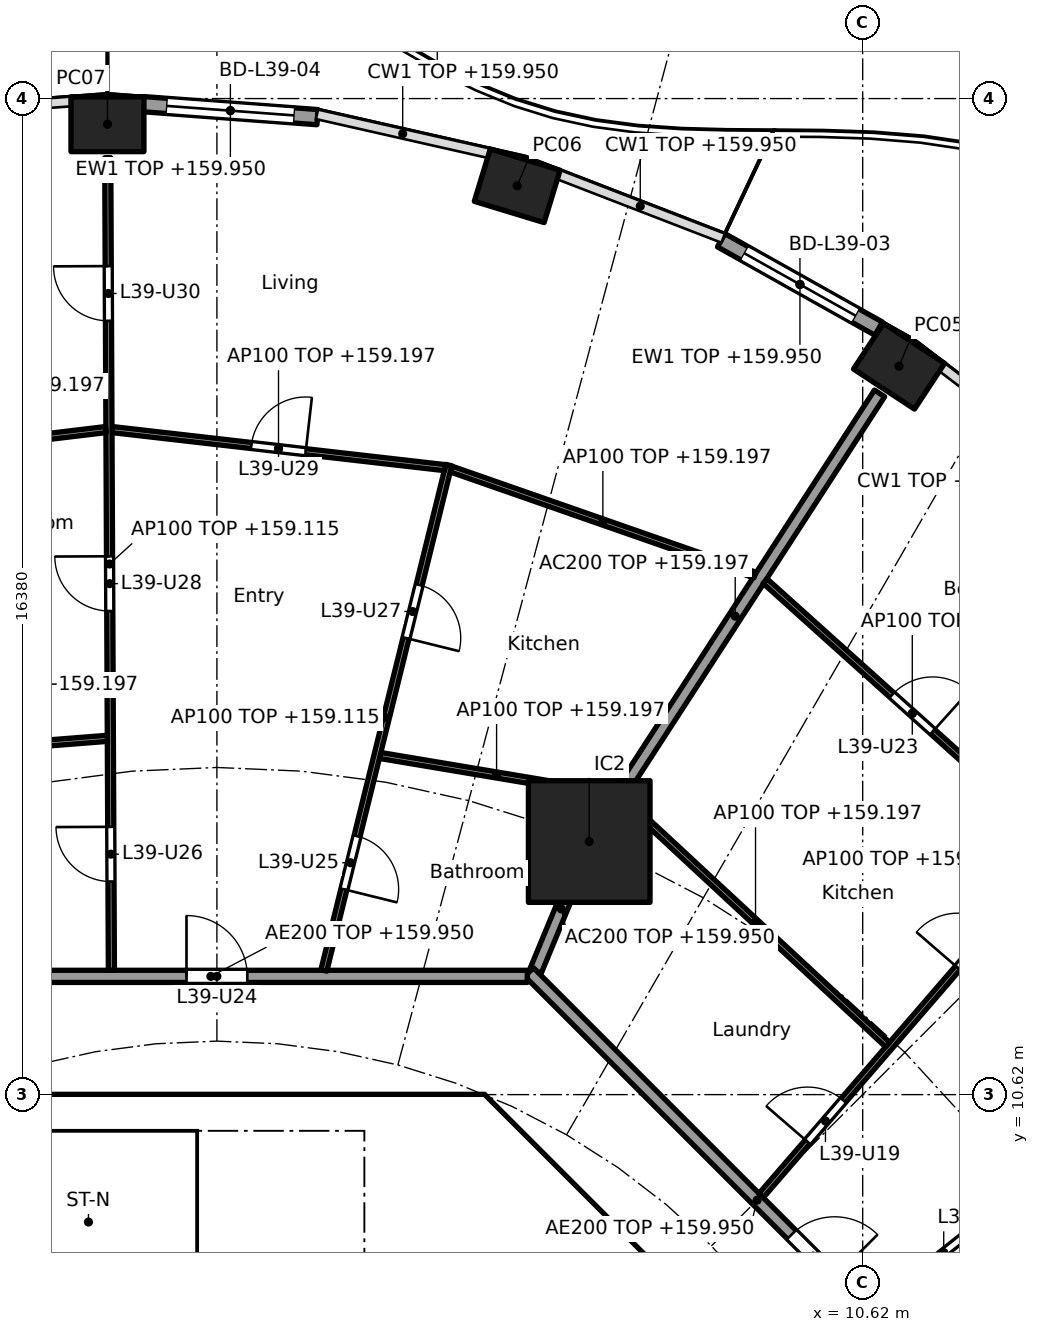
"""IFC4 building model, lengths in metres.
Left out: names, types, materials, properties, quantities, classifications, styles, units other than length and angle.
Written with IfcOpenShell. Run it as: python <this file> out.ifc"""

import sys

from ifc_helpers import new_model, si_unit, direction, frame, frame_2d, origin, origin_2d, place, context, subcontext, project, spatial, polyline, rectangle, hollow_rectangle, outline, extrude, element, fill, save


model = new_model("IFC4")
c1 = context("Model", 3, precision=1e-05, world=origin(), true_north=direction((0.0, 1.0)))
c2 = subcontext(c1, "Body", "Model", "MODEL_VIEW")
j1 = project(units=[si_unit("LENGTHUNIT", "METRE"), si_unit("PLANEANGLEUNIT", "RADIAN")], contexts=[c1])
p1 = place(None, origin())
s1 = spatial("IfcSite", under=j1, at=p1, CompositionType="ELEMENT")
p2 = place(p1, origin())
s2 = spatial("IfcBuilding", under=s1, at=p2, CompositionType="ELEMENT")
p3 = place(p2, frame((0.0, 0.0, 156.6)))
s3 = spatial("IfcBuildingStorey", under=s2, at=p3, CompositionType="ELEMENT", Elevation=156.6)
for number, where, z_axis, x_axis in (
    (1, (11.218, 22.599, 0.0), (0.0, 0.0, 1.0), (-0.836, 0.549, 0.0)),
    (2, (4.938, 25.565, 0.0), (0.0, 0.0, 1.0), (-0.957, 0.292, 0.0)),
    (3, (-1.8, 26.577, 0.0), (0.0, 0.0, 1.0), (-1.0, 0.0, 0.0)),
):
    element("IfcColumn", number, at=place(p3, frame(where, z_axis=z_axis, x_axis=x_axis)), inside=s3, PredefinedType="COLUMN", context=c2, shape_type="SweptSolid", body=[
        extrude(hollow_rectangle(XDim=1.2, YDim=0.9, WallThickness=0.04, at=origin_2d()), origin(), (0.0, 0.0, 1.0), 3.7),
    ])
p4 = place(p3, frame((6.123, 14.782, 0.0), z_axis=(0.0, 0.0, 1.0), x_axis=(1.0, 0.0, 0.0)))
e4 = element("IfcColumn", 4, at=p4, inside=s3, PredefinedType="COLUMN", context=c2, shape_type="SweptSolid", body=[
    extrude(rectangle(XDim=2.0, YDim=2.0, at=origin_2d()), origin(), (0.0, 0.0, 1.0), 3.7),
])
p5 = place(p3, frame((8.293, 24.67, 0.0), z_axis=(0.0, 0.0, 1.0), x_axis=(0.87206688547, -0.489386705241, 0.0)))
e5 = element("IfcWall", 5, at=p5, inside=s3, PredefinedType="SOLIDWALL", context=c2, shape_type="SweptSolid", body=[
    extrude(rectangle(XDim=2.97, YDim=0.25, at=frame_2d((1.485, 0.0))), origin(), (0.0, 0.0, 1.0), 3.35),
])
p6 = place(p5, frame((0.435, 0.0, 0.0)))
e6 = element("IfcOpeningElement", 6, at=p6, cuts=e5, PredefinedType="OPENING", context=c2, shape_type="SweptSolid", body=[
    extrude(rectangle(XDim=2.1, YDim=2.4, at=frame_2d((1.05, 1.2))), frame((0.0, 0.135, 0.0), z_axis=(0.0, -1.0, 0.0), x_axis=(1.0, 0.0, 0.0)), (0.0, 0.0, 1.0), 0.27),
])
p7 = place(p3, frame((-1.211, 26.908, 0.0), z_axis=(0.0, 0.0, 1.0), x_axis=(0.997232166829, -0.074350557769, 0.0)))
e7 = element("IfcWall", 7, at=p7, inside=s3, PredefinedType="SOLIDWALL", context=c2, shape_type="SweptSolid", body=[
    extrude(rectangle(XDim=2.873, YDim=0.25, at=frame_2d((1.437, 0.0))), origin(), (0.0, 0.0, 1.0), 3.35),
])
p8 = place(p7, frame((0.386, 0.0, 0.0)))
e8 = element("IfcOpeningElement", 8, at=p8, cuts=e7, PredefinedType="OPENING", context=c2, shape_type="SweptSolid", body=[
    extrude(rectangle(XDim=2.1, YDim=2.4, at=frame_2d((1.05, 1.2))), frame((0.0, 0.135, 0.0), z_axis=(0.0, -1.0, 0.0), x_axis=(1.0, 0.0, 0.0)), (0.0, 0.0, 1.0), 0.27),
])
p9 = place(p3, frame((9.988, 4.613, 0.0), z_axis=(0.0, 0.0, 1.0), x_axis=(-0.707106781187, 0.707106781187, 0.0)))
e9 = element("IfcWall", 9, at=p9, inside=s3, PredefinedType="SHEAR", context=c2, shape_type="SweptSolid", body=[
    extrude(rectangle(XDim=7.602, YDim=0.6, at=frame_2d((3.801, 0.0))), origin(), (0.0, 0.0, 1.0), 3.35),
])
p10 = place(p9, frame((3.201, 0.0, 0.0)))
e10 = element("IfcOpeningElement", 10, at=p10, cuts=e9, PredefinedType="OPENING", context=c2, shape_type="SweptSolid", body=[
    extrude(rectangle(XDim=1.2, YDim=2.1, at=frame_2d((0.6, 1.05))), frame((0.0, 0.31, 0.0), z_axis=(0.0, -1.0, 0.0), x_axis=(1.0, 0.0, 0.0)), (0.0, 0.0, 1.0), 0.62),
])
p11 = place(p3, frame((4.0, 7.025, 0.0), z_axis=(0.0, 0.0, 1.0), x_axis=(0.0, 1.0, 0.0)))
e11 = element("IfcWall", 11, at=p11, inside=s3, PredefinedType="SOLIDWALL", context=c2, shape_type="SweptSolid", body=[
    extrude(rectangle(XDim=3.0, YDim=0.2, at=frame_2d((1.5, 0.0))), origin(), (0.0, 0.0, 1.0), 3.35),
])
p12 = place(p11, frame((0.925, 0.0, 0.0)))
e12 = element("IfcOpeningElement", 12, at=p12, cuts=e11, PredefinedType="OPENING", context=c2, shape_type="SweptSolid", body=[
    extrude(rectangle(XDim=1.1, YDim=2.1, at=frame_2d((0.55, 1.05))), frame((0.0, 0.11, 0.0), z_axis=(0.0, -1.0, 0.0), x_axis=(1.0, 0.0, 0.0)), (0.0, 0.0, 1.0), 0.22),
])
p13 = place(p3, origin())
e13 = element("IfcWall", 13, at=p13, inside=s3, PredefinedType="SHEAR", context=c2, shape_type="SweptSolid", body=[
    extrude(outline(polyline([(-4.152, 10.025), (-4.401, 9.776), (-4.825, 10.2), (-4.401, 10.625), (4.401, 10.625), (4.825, 10.2), (4.401, 9.776), (4.152, 10.025), (-4.152, 10.025)])), origin(), (0.0, 0.0, 1.0), 3.35),
])
p14 = place(p3, frame((5.243, 12.657, 0.0), z_axis=(0.0, 0.0, 1.0), x_axis=(0.38273085373, 0.923859888513, 0.0)))
e14 = element("IfcWall", 14, at=p14, inside=s3, PredefinedType="PARTITIONING", context=c2, shape_type="SweptSolid", body=[
    extrude(rectangle(XDim=2.199, YDim=0.2, at=frame_2d((1.1, 0.0))), origin(), (0.0, 0.0, 1.0), 3.35),
])
p15 = place(p3, frame((6.15, 14.824, 0.0), z_axis=(0.0, 0.0, 1.0), x_axis=(0.543695254109, 0.839282711998, 0.0)))
e15 = element("IfcWall", 15, at=p15, inside=s3, PredefinedType="PARTITIONING", context=c2, shape_type="SweptSolid", body=[
    extrude(rectangle(XDim=8.731, YDim=0.2, at=frame_2d((4.366, 0.0))), origin(), (0.0, 0.0, 1.0), 2.597),
])
p16 = place(p3, frame((12.635, 5.134, 0.0), z_axis=(0.0, 0.0, 1.0), x_axis=(-0.707106781187, 0.707106781187, 0.0)))
e16 = element("IfcWall", 16, at=p16, inside=s3, PredefinedType="PARTITIONING", context=c2, shape_type="SweptSolid", body=[
    extrude(rectangle(XDim=10.609, YDim=0.2, at=frame_2d((5.305, 0.0))), origin(), (0.0, 0.0, 1.0), 3.35),
])
p17 = place(p16, frame((3.503, 0.0, 0.0)))
e17 = element("IfcOpeningElement", 17, at=p17, cuts=e16, PredefinedType="OPENING", context=c2, shape_type="SweptSolid", body=[
    extrude(rectangle(XDim=1.0, YDim=2.1, at=frame_2d((0.5, 1.05))), frame((0.0, 0.11, 0.0), z_axis=(0.0, -1.0, 0.0), x_axis=(1.0, 0.0, 0.0)), (0.0, 0.0, 1.0), 0.22),
])
p18 = place(p3, frame((5.104, 12.565, 0.0), z_axis=(0.0, 0.0, 1.0), x_axis=(-1.0, 0.0, 0.0)))
e18 = element("IfcWall", 18, at=p18, inside=s3, PredefinedType="PARTITIONING", context=c2, shape_type="SweptSolid", body=[
    extrude(rectangle(XDim=10.409, YDim=0.2, at=frame_2d((5.205, 0.0))), origin(), (0.0, 0.0, 1.0), 3.35),
])
p19 = place(p18, frame((4.604, 0.0, 0.0)))
e19 = element("IfcOpeningElement", 19, at=p19, cuts=e18, PredefinedType="OPENING", context=c2, shape_type="SweptSolid", body=[
    extrude(rectangle(XDim=1.0, YDim=2.1, at=frame_2d((0.5, 1.05))), frame((0.0, 0.11, 0.0), z_axis=(0.0, -1.0, 0.0), x_axis=(1.0, 0.0, 0.0)), (0.0, 0.0, 1.0), 0.22),
])
p20 = place(p3, frame((10.803, 7.107, 0.0), z_axis=(0.0, 0.0, 1.0), x_axis=(0.782908385935, 0.622137010017, 0.0)))
e20 = element("IfcWall", 20, at=p20, inside=s3, PredefinedType="PARTITIONING", context=c2, shape_type="SweptSolid", body=[
    extrude(rectangle(XDim=2.937, YDim=0.1, at=frame_2d((1.469, 0.0))), origin(), (0.0, 0.0, 1.0), 2.515),
])
p21 = place(p20, frame((1.019, 0.0, 0.0)))
e21 = element("IfcOpeningElement", 21, at=p21, cuts=e20, PredefinedType="OPENING", context=c2, shape_type="SweptSolid", body=[
    extrude(rectangle(XDim=0.9, YDim=2.1, at=frame_2d((0.45, 1.05))), frame((0.0, 0.06, 0.0), z_axis=(0.0, -1.0, 0.0), x_axis=(1.0, 0.0, 0.0)), (0.0, 0.0, 1.0), 0.12),
])
p22 = place(p3, frame((8.95, 8.96, 0.0), z_axis=(0.0, 0.0, 1.0), x_axis=(0.653830241148, 0.756641272837, 0.0)))
e22 = element("IfcWall", 22, at=p22, inside=s3, PredefinedType="PARTITIONING", context=c2, shape_type="SweptSolid", body=[
    extrude(rectangle(XDim=11.208, YDim=0.1, at=frame_2d((5.604, 0.0))), origin(), (0.0, 0.0, 1.0), 2.515),
])
p23 = place(p22, frame((1.168, 0.0, 0.0)))
e23 = element("IfcOpeningElement", 23, at=p23, cuts=e22, PredefinedType="OPENING", context=c2, shape_type="SweptSolid", body=[
    extrude(rectangle(XDim=0.9, YDim=2.1, at=frame_2d((0.45, 1.05))), frame((0.0, 0.06, 0.0), z_axis=(0.0, -1.0, 0.0), x_axis=(1.0, 0.0, 0.0)), (0.0, 0.0, 1.0), 0.12),
])
p24 = place(p22, frame((4.948, 0.0, 0.0)))
e24 = element("IfcOpeningElement", 24, at=p24, cuts=e22, PredefinedType="OPENING", context=c2, shape_type="SweptSolid", body=[
    extrude(rectangle(XDim=0.9, YDim=2.1, at=frame_2d((0.45, 1.05))), frame((0.0, 0.06, 0.0), z_axis=(0.0, -1.0, 0.0), x_axis=(1.0, 0.0, 0.0)), (0.0, 0.0, 1.0), 0.12),
])
p25 = place(p3, frame((11.029, 11.443, 0.0), z_axis=(0.0, 0.0, 1.0), x_axis=(-0.733113447346, 0.680106369122, 0.0)))
e25 = element("IfcWall", 25, at=p25, inside=s3, PredefinedType="PARTITIONING", context=c2, shape_type="SweptSolid", body=[
    extrude(rectangle(XDim=5.923, YDim=0.1, at=frame_2d((2.961, 0.0))), origin(), (0.0, 0.0, 1.0), 2.597),
])
p26 = place(p3, frame((13.856, 14.714, 0.0), z_axis=(0.0, 0.0, 1.0), x_axis=(-0.743799395746, 0.668402916577, 0.0)))
e26 = element("IfcWall", 26, at=p26, inside=s3, PredefinedType="PARTITIONING", context=c2, shape_type="SweptSolid", body=[
    extrude(rectangle(XDim=6.509, YDim=0.1, at=frame_2d((3.254, 0.0))), origin(), (0.0, 0.0, 1.0), 2.597),
])
p27 = place(p26, frame((2.804, 0.0, 0.0)))
e27 = element("IfcOpeningElement", 27, at=p27, cuts=e26, PredefinedType="OPENING", context=c2, shape_type="SweptSolid", body=[
    extrude(rectangle(XDim=0.9, YDim=2.1, at=frame_2d((0.45, 1.05))), frame((0.0, 0.06, 0.0), z_axis=(0.0, -1.0, 0.0), x_axis=(1.0, 0.0, 0.0)), (0.0, 0.0, 1.0), 0.12),
])
p28 = place(p3, frame((6.515, 15.556, 0.0), z_axis=(0.0, 0.0, 1.0), x_axis=(-0.986271328884, 0.16513287323, 0.0)))
e28 = element("IfcWall", 28, at=p28, inside=s3, PredefinedType="PARTITIONING", context=c2, shape_type="SweptSolid", body=[
    extrude(rectangle(XDim=3.884, YDim=0.1, at=frame_2d((1.942, 0.0))), origin(), (0.0, 0.0, 1.0), 2.597),
])
p29 = place(p3, frame((8.846, 19.165, 0.0), z_axis=(0.0, 0.0, 1.0), x_axis=(-0.944186503813, 0.329411362915, 0.0)))
e29 = element("IfcWall", 29, at=p29, inside=s3, PredefinedType="PARTITIONING", context=c2, shape_type="SweptSolid", body=[
    extrude(rectangle(XDim=5.293, YDim=0.1, at=frame_2d((2.646, 0.0))), origin(), (0.0, 0.0, 1.0), 2.597),
])
p30 = place(p3, frame((1.759, 12.662, 0.0), z_axis=(0.0, 0.0, 1.0), x_axis=(0.239964949221, 0.970781552743, 0.0)))
e30 = element("IfcWall", 30, at=p30, inside=s3, PredefinedType="PARTITIONING", context=c2, shape_type="SweptSolid", body=[
    extrude(rectangle(XDim=8.562, YDim=0.1, at=frame_2d((4.281, 0.0))), origin(), (0.0, 0.0, 1.0), 2.515),
])
p31 = place(p30, frame((1.375, 0.0, 0.0)))
e31 = element("IfcOpeningElement", 31, at=p31, cuts=e30, PredefinedType="OPENING", context=c2, shape_type="SweptSolid", body=[
    extrude(rectangle(XDim=0.9, YDim=2.1, at=frame_2d((0.45, 1.05))), frame((0.0, 0.06, 0.0), z_axis=(0.0, -1.0, 0.0), x_axis=(1.0, 0.0, 0.0)), (0.0, 0.0, 1.0), 0.12),
])
p32 = place(p30, frame((5.631, 0.0, 0.0)))
e32 = element("IfcOpeningElement", 32, at=p32, cuts=e30, PredefinedType="OPENING", context=c2, shape_type="SweptSolid", body=[
    extrude(rectangle(XDim=0.9, YDim=2.1, at=frame_2d((0.45, 1.05))), frame((0.0, 0.06, 0.0), z_axis=(0.0, -1.0, 0.0), x_axis=(1.0, 0.0, 0.0)), (0.0, 0.0, 1.0), 0.12),
])
p33 = place(p3, frame((3.751, 20.93, 0.0), z_axis=(0.0, 0.0, 1.0), x_axis=(-0.993522105273, 0.113639017658, 0.0)))
e33 = element("IfcWall", 33, at=p33, inside=s3, PredefinedType="PARTITIONING", context=c2, shape_type="SweptSolid", body=[
    extrude(rectangle(XDim=5.513, YDim=0.1, at=frame_2d((2.756, 0.0))), origin(), (0.0, 0.0, 1.0), 2.597),
])
p34 = place(p33, frame((2.306, 0.0, 0.0)))
e34 = element("IfcOpeningElement", 34, at=p34, cuts=e33, PredefinedType="OPENING", context=c2, shape_type="SweptSolid", body=[
    extrude(rectangle(XDim=0.9, YDim=2.1, at=frame_2d((0.45, 1.05))), frame((0.0, 0.06, 0.0), z_axis=(0.0, -1.0, 0.0), x_axis=(1.0, 0.0, 0.0)), (0.0, 0.0, 1.0), 0.12),
])
p35 = place(p3, frame((-1.735, 12.665, 0.0), z_axis=(0.0, 0.0, 1.0), x_axis=(-0.004494500855, 0.99998989968, 0.0)))
e35 = element("IfcWall", 35, at=p35, inside=s3, PredefinedType="PARTITIONING", context=c2, shape_type="SweptSolid", body=[
    extrude(rectangle(XDim=13.363, YDim=0.1, at=frame_2d((6.681, 0.0))), origin(), (0.0, 0.0, 1.0), 2.515),
])
p36 = place(p35, frame((1.459, 0.0, 0.0)))
e36 = element("IfcOpeningElement", 36, at=p36, cuts=e35, PredefinedType="OPENING", context=c2, shape_type="SweptSolid", body=[
    extrude(rectangle(XDim=0.9, YDim=2.1, at=frame_2d((0.45, 1.05))), frame((0.0, 0.06, 0.0), z_axis=(0.0, -1.0, 0.0), x_axis=(1.0, 0.0, 0.0)), (0.0, 0.0, 1.0), 0.12),
])
p37 = place(p35, frame((5.908, 0.0, 0.0)))
e37 = element("IfcOpeningElement", 37, at=p37, cuts=e35, PredefinedType="OPENING", context=c2, shape_type="SweptSolid", body=[
    extrude(rectangle(XDim=0.9, YDim=2.1, at=frame_2d((0.45, 1.05))), frame((0.0, 0.06, 0.0), z_axis=(0.0, -1.0, 0.0), x_axis=(1.0, 0.0, 0.0)), (0.0, 0.0, 1.0), 0.12),
])
p38 = place(p35, frame((10.68, 0.0, 0.0)))
e38 = element("IfcOpeningElement", 38, at=p38, cuts=e35, PredefinedType="OPENING", context=c2, shape_type="SweptSolid", body=[
    extrude(rectangle(XDim=0.9, YDim=2.1, at=frame_2d((0.45, 1.05))), frame((0.0, 0.06, 0.0), z_axis=(0.0, -1.0, 0.0), x_axis=(1.0, 0.0, 0.0)), (0.0, 0.0, 1.0), 0.12),
])
p39 = place(p3, frame((-1.802, 16.479, 0.0), z_axis=(0.0, 0.0, 1.0), x_axis=(-0.996907698294, -0.078581429625, 0.0)))
e39 = element("IfcWall", 39, at=p39, inside=s3, PredefinedType="PARTITIONING", context=c2, shape_type="SweptSolid", body=[
    extrude(rectangle(XDim=4.536, YDim=0.1, at=frame_2d((2.268, 0.0))), origin(), (0.0, 0.0, 1.0), 2.597),
])
p40 = place(p3, frame((-1.825, 21.557, 0.0), z_axis=(0.0, 0.0, 1.0), x_axis=(-0.992915053711, -0.11882632753, 0.0)))
e40 = element("IfcWall", 40, at=p40, inside=s3, PredefinedType="PARTITIONING", context=c2, shape_type="SweptSolid", body=[
    extrude(rectangle(XDim=5.615, YDim=0.1, at=frame_2d((2.808, 0.0))), origin(), (0.0, 0.0, 1.0), 2.597),
])
p41 = place(p40, frame((3.774, 0.0, 0.0)))
e41 = element("IfcOpeningElement", 41, at=p41, cuts=e40, PredefinedType="OPENING", context=c2, shape_type="SweptSolid", body=[
    extrude(rectangle(XDim=0.9, YDim=2.1, at=frame_2d((0.45, 1.05))), frame((0.0, 0.06, 0.0), z_axis=(0.0, -1.0, 0.0), x_axis=(1.0, 0.0, 0.0)), (0.0, 0.0, 1.0), 0.12),
])
p42 = place(p6, origin())
e42 = element("IfcDoor", 42, at=p42, inside=s3, OperationType="SLIDING_TO_LEFT", PredefinedType="DOOR", context=c2, shape_type="SweptSolid", body=[
    extrude(rectangle(XDim=2.1, YDim=2.4, at=frame_2d((1.05, 1.2))), frame((0.0, 0.025, 0.0), z_axis=(0.0, -1.0, 0.0), x_axis=(1.0, 0.0, 0.0)), (0.0, 0.0, 1.0), 0.05),
])
fill(e6, e42)
p43 = place(p8, origin())
e43 = element("IfcDoor", 43, at=p43, inside=s3, OperationType="SLIDING_TO_LEFT", PredefinedType="DOOR", context=c2, shape_type="SweptSolid", body=[
    extrude(rectangle(XDim=2.1, YDim=2.4, at=frame_2d((1.05, 1.2))), frame((0.0, 0.025, 0.0), z_axis=(0.0, -1.0, 0.0), x_axis=(1.0, 0.0, 0.0)), (0.0, 0.0, 1.0), 0.05),
])
fill(e8, e43)
p44 = place(p12, origin())
e44 = element("IfcDoor", 44, at=p44, inside=s3, OperationType="SINGLE_SWING_RIGHT", PredefinedType="DOOR", context=c2, shape_type="SweptSolid", body=[
    extrude(rectangle(XDim=1.1, YDim=2.1, at=frame_2d((0.55, 1.05))), frame((0.0, 0.025, 0.0), z_axis=(0.0, -1.0, 0.0), x_axis=(1.0, 0.0, 0.0)), (0.0, 0.0, 1.0), 0.05),
])
fill(e12, e44)
p45 = place(p17, frame((1.0, 0.0, 0.0), x_axis=(-1.0, 0.0, 0.0)))
e45 = element("IfcDoor", 45, at=p45, inside=s3, OperationType="SINGLE_SWING_RIGHT", PredefinedType="DOOR", context=c2, shape_type="SweptSolid", body=[
    extrude(rectangle(XDim=1.0, YDim=2.1, at=frame_2d((0.5, 1.05))), frame((0.0, 0.025, 0.0), z_axis=(0.0, -1.0, 0.0), x_axis=(1.0, 0.0, 0.0)), (0.0, 0.0, 1.0), 0.05),
])
fill(e17, e45)
p46 = place(p21, frame((0.9, 0.0, 0.0), x_axis=(-1.0, 0.0, 0.0)))
e46 = element("IfcDoor", 46, at=p46, inside=s3, OperationType="SINGLE_SWING_LEFT", PredefinedType="DOOR", context=c2, shape_type="SweptSolid", body=[
    extrude(rectangle(XDim=0.9, YDim=2.1, at=frame_2d((0.45, 1.05))), frame((0.0, 0.025, 0.0), z_axis=(0.0, -1.0, 0.0), x_axis=(1.0, 0.0, 0.0)), (0.0, 0.0, 1.0), 0.05),
])
fill(e21, e46)
p47 = place(p23, origin())
e47 = element("IfcDoor", 47, at=p47, inside=s3, OperationType="SINGLE_SWING_LEFT", PredefinedType="DOOR", context=c2, shape_type="SweptSolid", body=[
    extrude(rectangle(XDim=0.9, YDim=2.1, at=frame_2d((0.45, 1.05))), frame((0.0, 0.025, 0.0), z_axis=(0.0, -1.0, 0.0), x_axis=(1.0, 0.0, 0.0)), (0.0, 0.0, 1.0), 0.05),
])
fill(e23, e47)
p48 = place(p24, origin())
e48 = element("IfcDoor", 48, at=p48, inside=s3, OperationType="SINGLE_SWING_LEFT", PredefinedType="DOOR", context=c2, shape_type="SweptSolid", body=[
    extrude(rectangle(XDim=0.9, YDim=2.1, at=frame_2d((0.45, 1.05))), frame((0.0, 0.025, 0.0), z_axis=(0.0, -1.0, 0.0), x_axis=(1.0, 0.0, 0.0)), (0.0, 0.0, 1.0), 0.05),
])
fill(e24, e48)
p49 = place(p27, frame((0.9, 0.0, 0.0), x_axis=(-1.0, 0.0, 0.0)))
e49 = element("IfcDoor", 49, at=p49, inside=s3, OperationType="SINGLE_SWING_RIGHT", PredefinedType="DOOR", context=c2, shape_type="SweptSolid", body=[
    extrude(rectangle(XDim=0.9, YDim=2.1, at=frame_2d((0.45, 1.05))), frame((0.0, 0.025, 0.0), z_axis=(0.0, -1.0, 0.0), x_axis=(1.0, 0.0, 0.0)), (0.0, 0.0, 1.0), 0.05),
])
fill(e27, e49)
p50 = place(p19, frame((1.0, 0.0, 0.0), x_axis=(-1.0, 0.0, 0.0)))
e50 = element("IfcDoor", 50, at=p50, inside=s3, OperationType="SINGLE_SWING_LEFT", PredefinedType="DOOR", context=c2, shape_type="SweptSolid", body=[
    extrude(rectangle(XDim=1.0, YDim=2.1, at=frame_2d((0.5, 1.05))), frame((0.0, 0.025, 0.0), z_axis=(0.0, -1.0, 0.0), x_axis=(1.0, 0.0, 0.0)), (0.0, 0.0, 1.0), 0.05),
])
fill(e19, e50)
p51 = place(p31, frame((0.9, 0.0, 0.0), x_axis=(-1.0, 0.0, 0.0)))
e51 = element("IfcDoor", 51, at=p51, inside=s3, OperationType="SINGLE_SWING_RIGHT", PredefinedType="DOOR", context=c2, shape_type="SweptSolid", body=[
    extrude(rectangle(XDim=0.9, YDim=2.1, at=frame_2d((0.45, 1.05))), frame((0.0, 0.025, 0.0), z_axis=(0.0, -1.0, 0.0), x_axis=(1.0, 0.0, 0.0)), (0.0, 0.0, 1.0), 0.05),
])
fill(e31, e51)
p52 = place(p36, origin())
e52 = element("IfcDoor", 52, at=p52, inside=s3, OperationType="SINGLE_SWING_RIGHT", PredefinedType="DOOR", context=c2, shape_type="SweptSolid", body=[
    extrude(rectangle(XDim=0.9, YDim=2.1, at=frame_2d((0.45, 1.05))), frame((0.0, 0.025, 0.0), z_axis=(0.0, -1.0, 0.0), x_axis=(1.0, 0.0, 0.0)), (0.0, 0.0, 1.0), 0.05),
])
fill(e36, e52)
p53 = place(p32, frame((0.9, 0.0, 0.0), x_axis=(-1.0, 0.0, 0.0)))
e53 = element("IfcDoor", 53, at=p53, inside=s3, OperationType="SINGLE_SWING_RIGHT", PredefinedType="DOOR", context=c2, shape_type="SweptSolid", body=[
    extrude(rectangle(XDim=0.9, YDim=2.1, at=frame_2d((0.45, 1.05))), frame((0.0, 0.025, 0.0), z_axis=(0.0, -1.0, 0.0), x_axis=(1.0, 0.0, 0.0)), (0.0, 0.0, 1.0), 0.05),
])
fill(e32, e53)
p54 = place(p37, origin())
e54 = element("IfcDoor", 54, at=p54, inside=s3, OperationType="SINGLE_SWING_RIGHT", PredefinedType="DOOR", context=c2, shape_type="SweptSolid", body=[
    extrude(rectangle(XDim=0.9, YDim=2.1, at=frame_2d((0.45, 1.05))), frame((0.0, 0.025, 0.0), z_axis=(0.0, -1.0, 0.0), x_axis=(1.0, 0.0, 0.0)), (0.0, 0.0, 1.0), 0.05),
])
fill(e37, e54)
p55 = place(p34, frame((0.9, 0.0, 0.0), x_axis=(-1.0, 0.0, 0.0)))
e55 = element("IfcDoor", 55, at=p55, inside=s3, OperationType="SINGLE_SWING_RIGHT", PredefinedType="DOOR", context=c2, shape_type="SweptSolid", body=[
    extrude(rectangle(XDim=0.9, YDim=2.1, at=frame_2d((0.45, 1.05))), frame((0.0, 0.025, 0.0), z_axis=(0.0, -1.0, 0.0), x_axis=(1.0, 0.0, 0.0)), (0.0, 0.0, 1.0), 0.05),
])
fill(e34, e55)
p56 = place(p38, origin())
e56 = element("IfcDoor", 56, at=p56, inside=s3, OperationType="SINGLE_SWING_RIGHT", PredefinedType="DOOR", context=c2, shape_type="SweptSolid", body=[
    extrude(rectangle(XDim=0.9, YDim=2.1, at=frame_2d((0.45, 1.05))), frame((0.0, 0.025, 0.0), z_axis=(0.0, -1.0, 0.0), x_axis=(1.0, 0.0, 0.0)), (0.0, 0.0, 1.0), 0.05),
])
fill(e38, e56)
save(model, sys.argv[1])
